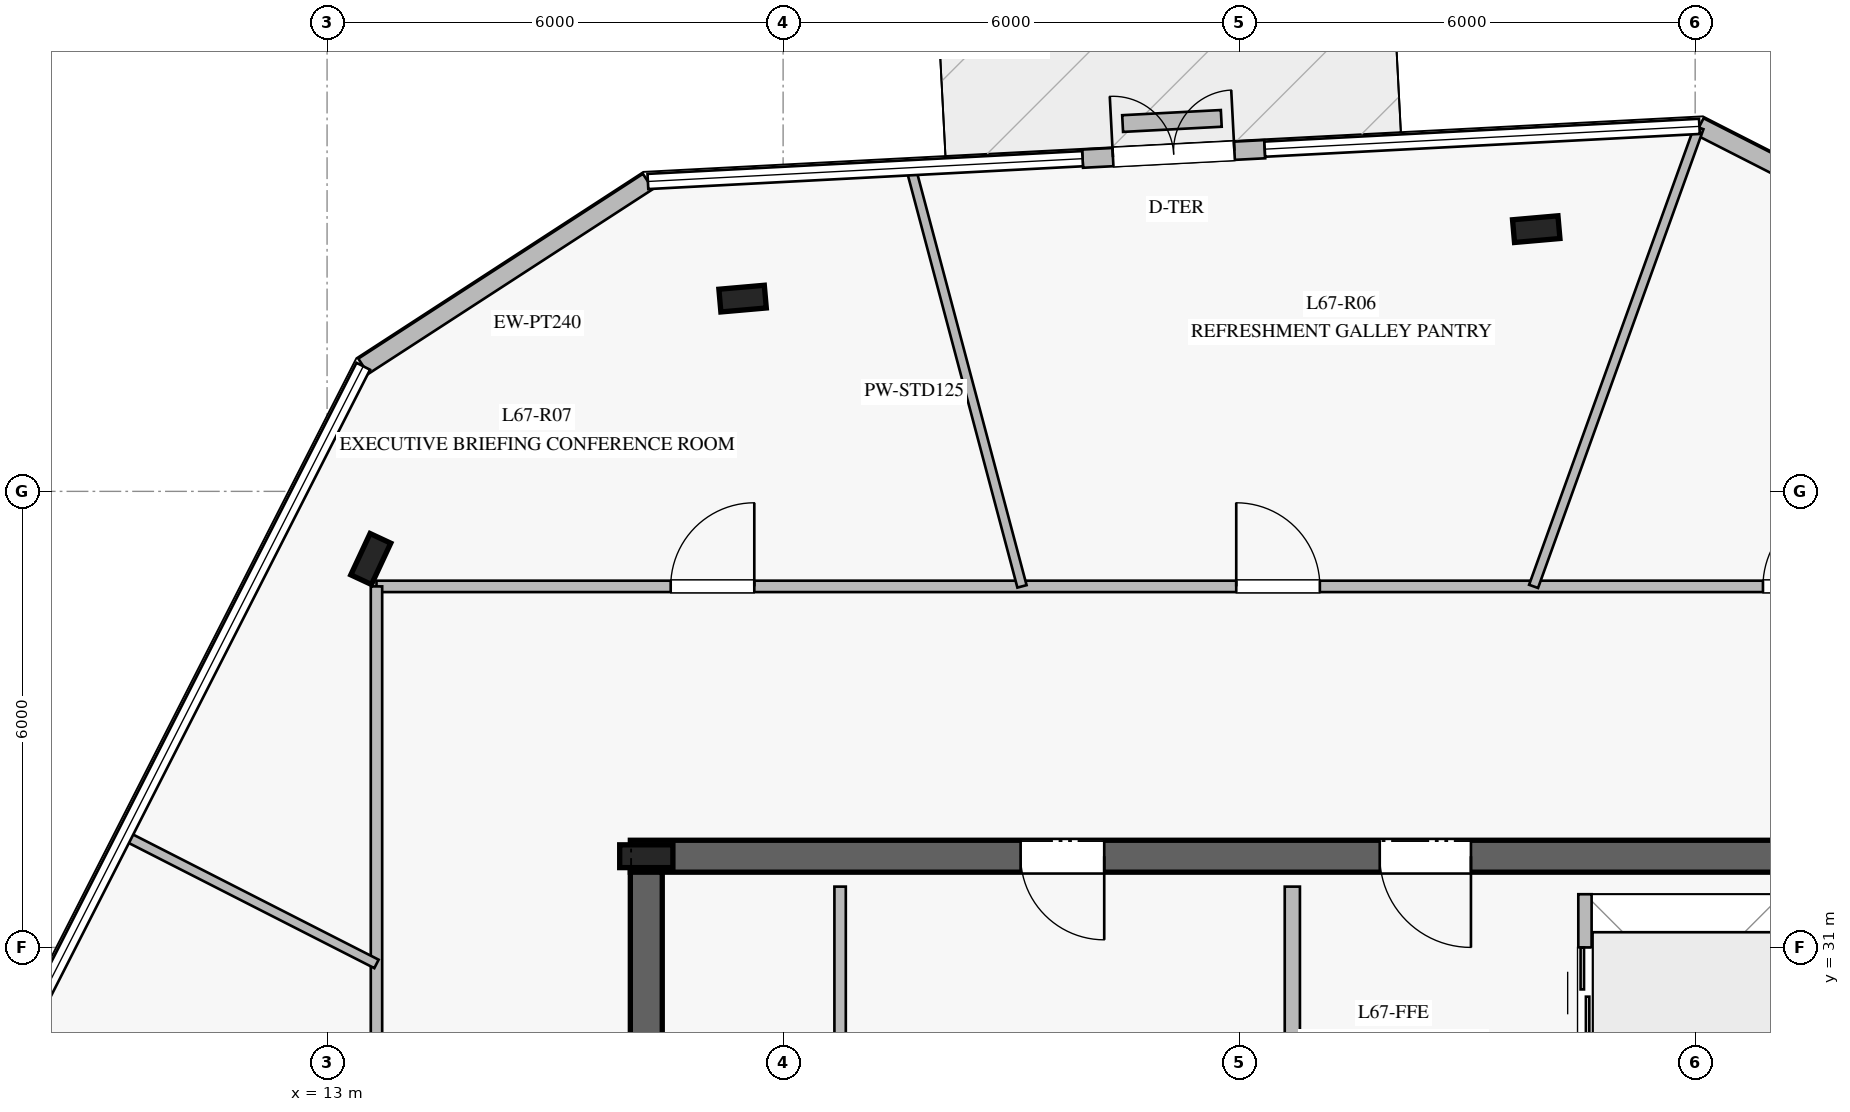
"""IFC4 building model, lengths in metres.
Left out: names, types, materials, properties, quantities, classifications, styles, units other than length and angle.
Written with IfcOpenShell. Run it as: python <this file> out.ifc"""

import sys

from ifc_helpers import new_model, si_unit, direction, frame, frame_2d, origin, origin_2d, place, context, subcontext, project, spatial, rectangle, i_section, extrude, element, fill, save


model = new_model("IFC4")
c1 = context("Model", 3, precision=1e-05, world=origin(), true_north=direction((0.0, 1.0)))
c2 = subcontext(c1, "Body", "Model", "MODEL_VIEW")
j1 = project(units=[si_unit("LENGTHUNIT", "METRE"), si_unit("PLANEANGLEUNIT", "RADIAN")], contexts=[c1])
p1 = place(None, origin())
s1 = spatial("IfcSite", under=j1, at=p1, CompositionType="ELEMENT")
p2 = place(p1, origin())
s2 = spatial("IfcBuilding", under=s1, at=p2, CompositionType="ELEMENT")
p3 = place(p2, frame((0.0, 0.0, 278.2)))
s3 = spatial("IfcBuildingStorey", under=s2, at=p3, CompositionType="ELEMENT", Elevation=278.2)
p4 = place(p3, frame((33.01, 32.2, 0.0), z_axis=(0.0, 0.0, 1.0), x_axis=(-1.0, 0.0, 0.0)))
e1 = element("IfcWall", 1, at=p4, inside=s3, PredefinedType="SHEAR", context=c2, shape_type="SweptSolid", body=[
    extrude(rectangle(XDim=16.02, YDim=0.42, at=frame_2d((8.01, 0.0))), origin(), (0.0, 0.0, 1.0), 3.78),
])
p5 = place(p4, frame((4.96, 0.0, 0.0)))
e2 = element("IfcOpeningElement", 2, at=p5, cuts=e1, PredefinedType="OPENING", context=c2, shape_type="SweptSolid", body=[
    extrude(rectangle(XDim=1.2, YDim=2.25, at=frame_2d((0.6, 1.125))), frame((0.0, 0.22, 0.0), z_axis=(0.0, -1.0, 0.0), x_axis=(1.0, 0.0, 0.0)), (0.0, 0.0, 1.0), 0.44),
])
p6 = place(p4, frame((9.785, 0.0, 0.0)))
e3 = element("IfcOpeningElement", 3, at=p6, cuts=e1, PredefinedType="OPENING", context=c2, shape_type="SweptSolid", body=[
    extrude(rectangle(XDim=1.1, YDim=2.2, at=frame_2d((0.55, 1.1))), frame((0.0, 0.22, 0.0), z_axis=(0.0, -1.0, 0.0), x_axis=(1.0, 0.0, 0.0)), (0.0, 0.0, 1.0), 0.44),
])
p7 = place(p3, frame((17.2, 31.99, 0.0), z_axis=(0.0, 0.0, 1.0), x_axis=(0.0, -1.0, 0.0)))
e4 = element("IfcWall", 4, at=p7, inside=s3, PredefinedType="SHEAR", context=c2, shape_type="SweptSolid", body=[
    extrude(rectangle(XDim=13.98, YDim=0.42, at=frame_2d((6.99, 0.0))), origin(), (0.0, 0.0, 1.0), 3.78),
])
p8 = place(p7, frame((2.14, 0.0, 0.0)))
e5 = element("IfcOpeningElement", 5, at=p8, cuts=e4, PredefinedType="OPENING", context=c2, shape_type="SweptSolid", body=[
    extrude(rectangle(XDim=1.5, YDim=2.2, at=frame_2d((0.75, 1.1))), frame((0.0, 0.22, 0.0), z_axis=(0.0, -1.0, 0.0), x_axis=(1.0, 0.0, 0.0)), (0.0, 0.0, 1.0), 0.44),
])
p9 = place(p3, frame((17.2, 32.2, 0.0), z_axis=(0.0, 0.0, 1.0), x_axis=(1.0, 0.0, 0.0)))
e6 = element("IfcColumn", 6, at=p9, inside=s3, PredefinedType="COLUMN", context=c2, shape_type="SweptSolid", body=[
    extrude(i_section(OverallWidth=0.3, OverallDepth=0.7, WebThickness=0.017, FlangeThickness=0.032, at=origin_2d()), origin(), (0.0, 0.0, 1.0), 4.0),
])
for number, where, z_axis, x_axis in (
    (7, (28.909, 40.45, 0.0), (0.0, 0.0, 1.0), (0.996, 0.087, 0.0)),
    (8, (18.467, 39.536, 0.0), (0.0, 0.0, 1.0), (0.996, 0.087, 0.0)),
    (9, (13.575, 36.11, 0.0), (0.0, 0.0, 1.0), (0.423, 0.906, 0.0)),
):
    element("IfcColumn", number, at=place(p3, frame(where, z_axis=z_axis, x_axis=x_axis)), inside=s3, PredefinedType="COLUMN", context=c2, shape_type="SweptSolid", body=[
        extrude(i_section(OverallWidth=0.3, OverallDepth=0.6, WebThickness=0.015, FlangeThickness=0.03, at=origin_2d()), origin(), (0.0, 0.0, 1.0), 4.0),
    ])
p10 = place(p3, frame((25.337, 41.502, 0.0), z_axis=(0.0, 0.0, 1.0), x_axis=(-0.998643002132, -0.052078347636, 0.0)))
e10 = element("IfcWall", 10, at=p10, inside=s3, PredefinedType="STANDARD", context=c2, shape_type="SweptSolid", body=[
    extrude(rectangle(XDim=2.4, YDim=0.24, at=frame_2d((1.2, 0.0))), origin(), (0.0, 0.0, 1.0), 3.78),
])
p11 = place(p10, frame((0.4, 0.0, 0.0)))
e11 = element("IfcOpeningElement", 11, at=p11, cuts=e10, PredefinedType="OPENING", context=c2, shape_type="SweptSolid", body=[
    extrude(rectangle(XDim=1.6, YDim=2.25, at=frame_2d((0.8, 1.125))), frame((0.0, 0.13, 0.0), z_axis=(0.0, -1.0, 0.0), x_axis=(1.0, 0.0, 0.0)), (0.0, 0.0, 1.0), 0.26),
])
p12 = place(p3, frame((17.221, 41.077, 0.0), z_axis=(0.0, 0.0, 1.0), x_axis=(-0.838777032967, -0.544475058169, 0.0)))
e12 = element("IfcWall", 12, at=p12, inside=s3, PredefinedType="STANDARD", context=c2, shape_type="SweptSolid", body=[
    extrude(rectangle(XDim=4.465, YDim=0.24, at=frame_2d((2.232, 0.0))), origin(), (0.0, 0.0, 1.0), 3.78),
])
p13 = place(p3, frame((35.034, 39.775, 0.0), z_axis=(0.0, 0.0, 1.0), x_axis=(-0.890988997793, 0.454024895586, 0.0)))
e13 = element("IfcWall", 13, at=p13, inside=s3, PredefinedType="STANDARD", context=c2, shape_type="SweptSolid", body=[
    extrude(rectangle(XDim=4.465, YDim=0.24, at=frame_2d((2.232, 0.0))), origin(), (0.0, 0.0, 1.0), 3.78),
])
p14 = place(p3, frame((24.765, 41.907, 0.0), z_axis=(0.0, 0.0, 1.0), x_axis=(-0.998635416873, -0.052223597797, 0.0)))
e14 = element("IfcWall", 14, at=p14, inside=s3, PredefinedType="USERDEFINED", context=c2, shape_type="SweptSolid", body=[
    extrude(rectangle(XDim=1.3, YDim=0.22, at=frame_2d((0.65, 0.0))), origin(), (0.0, 0.0, 1.0), 0.4),
])
p15 = place(p3, frame((25.7, 26.65, 0.0), z_axis=(0.0, 0.0, 1.0), x_axis=(0.0, 1.0, 0.0)))
e15 = element("IfcWall", 15, at=p15, inside=s3, PredefinedType="PARTITIONING", context=c2, shape_type="SweptSolid", body=[
    extrude(rectangle(XDim=5.15, YDim=0.2, at=frame_2d((2.575, 0.0))), origin(), (0.0, 0.0, 1.0), 3.78),
])
p16 = place(p3, frame((19.75, 29.39, 0.0), z_axis=(0.0, 0.0, 1.0), x_axis=(0.0, 1.0, 0.0)))
e16 = element("IfcWall", 16, at=p16, inside=s3, PredefinedType="PARTITIONING", context=c2, shape_type="SweptSolid", body=[
    extrude(rectangle(XDim=2.41, YDim=0.15, at=frame_2d((1.205, 0.0))), origin(), (0.0, 0.0, 1.0), 3.78),
])
p17 = place(p3, frame((29.55, 29.1, 0.0), z_axis=(0.0, 0.0, 1.0), x_axis=(0.0, 1.0, 0.0)))
e17 = element("IfcWall", 17, at=p17, inside=s3, PredefinedType="PARTITIONING", context=c2, shape_type="SweptSolid", body=[
    extrude(rectangle(XDim=2.6, YDim=0.175, at=frame_2d((1.3, 0.0))), origin(), (0.0, 0.0, 1.0), 3.78),
])
p18 = place(p17, frame((0.7, 0.0, 0.0)))
e18 = element("IfcOpeningElement", 18, at=p18, cuts=e17, PredefinedType="OPENING", context=c2, shape_type="SweptSolid", body=[
    extrude(rectangle(XDim=1.2, YDim=2.2, at=frame_2d((0.6, 1.1))), frame((0.0, 0.098, 0.0), z_axis=(0.0, -1.0, 0.0), x_axis=(1.0, 0.0, 0.0)), (0.0, 0.0, 1.0), 0.195),
])
p19 = place(p3, frame((13.65, 35.75, 0.0), z_axis=(0.0, 0.0, 1.0), x_axis=(1.0, 0.0, 0.0)))
e19 = element("IfcWall", 19, at=p19, inside=s3, PredefinedType="PARTITIONING", context=c2, shape_type="SweptSolid", body=[
    extrude(rectangle(XDim=22.7, YDim=0.15, at=frame_2d((11.35, 0.0))), origin(), (0.0, 0.0, 1.0), 3.05),
])
p20 = place(p19, frame((18.242, 0.0, 0.0)))
e20 = element("IfcOpeningElement", 20, at=p20, cuts=e19, PredefinedType="OPENING", context=c2, shape_type="SweptSolid", body=[
    extrude(rectangle(XDim=1.1, YDim=2.2, at=frame_2d((0.55, 1.1))), frame((0.0, 0.085, 0.0), z_axis=(0.0, -1.0, 0.0), x_axis=(1.0, 0.0, 0.0)), (0.0, 0.0, 1.0), 0.17),
])
p21 = place(p19, frame((11.312, 0.0, 0.0)))
e21 = element("IfcOpeningElement", 21, at=p21, cuts=e19, PredefinedType="OPENING", context=c2, shape_type="SweptSolid", body=[
    extrude(rectangle(XDim=1.1, YDim=2.2, at=frame_2d((0.55, 1.1))), frame((0.0, 0.085, 0.0), z_axis=(0.0, -1.0, 0.0), x_axis=(1.0, 0.0, 0.0)), (0.0, 0.0, 1.0), 0.17),
])
p22 = place(p19, frame((3.871, 0.0, 0.0)))
e22 = element("IfcOpeningElement", 22, at=p22, cuts=e19, PredefinedType="OPENING", context=c2, shape_type="SweptSolid", body=[
    extrude(rectangle(XDim=1.1, YDim=2.2, at=frame_2d((0.55, 1.1))), frame((0.0, 0.085, 0.0), z_axis=(0.0, -1.0, 0.0), x_axis=(1.0, 0.0, 0.0)), (0.0, 0.0, 1.0), 0.17),
])
p23 = place(p3, frame((13.65, 14.25, 0.0), z_axis=(0.0, 0.0, 1.0), x_axis=(0.0, 1.0, 0.0)))
e23 = element("IfcWall", 23, at=p23, inside=s3, PredefinedType="PARTITIONING", context=c2, shape_type="SweptSolid", body=[
    extrude(rectangle(XDim=21.5, YDim=0.15, at=frame_2d((10.75, 0.0))), origin(), (0.0, 0.0, 1.0), 3.22),
])
p24 = place(p23, frame((10.359, 0.0, 0.0)))
e24 = element("IfcOpeningElement", 24, at=p24, cuts=e23, PredefinedType="OPENING", context=c2, shape_type="SweptSolid", body=[
    extrude(rectangle(XDim=1.1, YDim=2.2, at=frame_2d((0.55, 1.1))), frame((0.0, 0.085, 0.0), z_axis=(0.0, -1.0, 0.0), x_axis=(1.0, 0.0, 0.0)), (0.0, 0.0, 1.0), 0.17),
])
p25 = place(p3, frame((22.143, 35.75, 0.0), z_axis=(0.0, 0.0, 1.0), x_axis=(-0.256710699473, 0.96648829107, 0.0)))
e25 = element("IfcWall", 25, at=p25, inside=s3, PredefinedType="PARTITIONING", context=c2, shape_type="SweptSolid", body=[
    extrude(rectangle(XDim=5.683, YDim=0.125, at=frame_2d((2.842, 0.0))), origin(), (0.0, 0.0, 1.0), 3.28),
])
p26 = place(p3, frame((13.65, 30.783, 0.0), z_axis=(0.0, 0.0, 1.0), x_axis=(-0.890937484948, 0.454125971416, 0.0)))
e26 = element("IfcWall", 26, at=p26, inside=s3, PredefinedType="PARTITIONING", context=c2, shape_type="SweptSolid", body=[
    extrude(rectangle(XDim=3.708, YDim=0.125, at=frame_2d((1.854, 0.0))), origin(), (0.0, 0.0, 1.0), 3.28),
])
p27 = place(p3, frame((28.874, 35.75, 0.0), z_axis=(0.0, 0.0, 1.0), x_axis=(0.3391479103, 0.940733062531, 0.0)))
e27 = element("IfcWall", 27, at=p27, inside=s3, PredefinedType="PARTITIONING", context=c2, shape_type="SweptSolid", body=[
    extrude(rectangle(XDim=6.416, YDim=0.125, at=frame_2d((3.208, 0.0))), origin(), (0.0, 0.0, 1.0), 3.05),
])
p28 = place(p11, frame((1.6, 0.0, 0.0), z_axis=(0.0, 0.0, 1.0), x_axis=(-1.0, 0.0, 0.0)))
e28 = element("IfcDoor", 28, at=p28, inside=s3, OperationType="DOUBLE_DOOR_SINGLE_SWING", PredefinedType="DOOR", context=c2, shape_type="SweptSolid", body=[
    extrude(rectangle(XDim=1.6, YDim=2.25, at=frame_2d((0.8, 1.125))), frame((0.0, 0.025, 0.0), z_axis=(0.0, -1.0, 0.0), x_axis=(1.0, 0.0, 0.0)), (0.0, 0.0, 1.0), 0.05),
])
fill(e11, e28)
p29 = place(p5, origin())
e29 = element("IfcDoor", 29, at=p29, inside=s3, OperationType="SINGLE_SWING_LEFT", PredefinedType="DOOR", context=c2, shape_type="SweptSolid", body=[
    extrude(rectangle(XDim=1.2, YDim=2.25, at=frame_2d((0.6, 1.125))), frame((0.0, 0.025, 0.0), z_axis=(0.0, -1.0, 0.0), x_axis=(1.0, 0.0, 0.0)), (0.0, 0.0, 1.0), 0.05),
])
fill(e2, e29)
p30 = place(p6, origin())
e30 = element("IfcDoor", 30, at=p30, inside=s3, OperationType="SINGLE_SWING_LEFT", PredefinedType="DOOR", context=c2, shape_type="SweptSolid", body=[
    extrude(rectangle(XDim=1.1, YDim=2.2, at=frame_2d((0.55, 1.1))), frame((0.0, 0.025, 0.0), z_axis=(0.0, -1.0, 0.0), x_axis=(1.0, 0.0, 0.0)), (0.0, 0.0, 1.0), 0.05),
])
fill(e3, e30)
p31 = place(p18, origin())
e31 = element("IfcDoor", 31, at=p31, inside=s3, OperationType="DOUBLE_DOOR_SLIDING", PredefinedType="DOOR", context=c2, shape_type="SweptSolid", body=[
    extrude(rectangle(XDim=1.2, YDim=2.2, at=frame_2d((0.6, 1.1))), frame((0.0, 0.025, 0.0), z_axis=(0.0, -1.0, 0.0), x_axis=(1.0, 0.0, 0.0)), (0.0, 0.0, 1.0), 0.05),
])
fill(e18, e31)
p32 = place(p20, origin())
e32 = element("IfcDoor", 32, at=p32, inside=s3, OperationType="SINGLE_SWING_RIGHT", PredefinedType="DOOR", context=c2, shape_type="SweptSolid", body=[
    extrude(rectangle(XDim=1.1, YDim=2.2, at=frame_2d((0.55, 1.1))), frame((0.0, 0.025, 0.0), z_axis=(0.0, -1.0, 0.0), x_axis=(1.0, 0.0, 0.0)), (0.0, 0.0, 1.0), 0.05),
])
fill(e20, e32)
p33 = place(p21, origin())
e33 = element("IfcDoor", 33, at=p33, inside=s3, OperationType="SINGLE_SWING_LEFT", PredefinedType="DOOR", context=c2, shape_type="SweptSolid", body=[
    extrude(rectangle(XDim=1.1, YDim=2.2, at=frame_2d((0.55, 1.1))), frame((0.0, 0.025, 0.0), z_axis=(0.0, -1.0, 0.0), x_axis=(1.0, 0.0, 0.0)), (0.0, 0.0, 1.0), 0.05),
])
fill(e21, e33)
p34 = place(p22, origin())
e34 = element("IfcDoor", 34, at=p34, inside=s3, OperationType="SINGLE_SWING_RIGHT", PredefinedType="DOOR", context=c2, shape_type="SweptSolid", body=[
    extrude(rectangle(XDim=1.1, YDim=2.2, at=frame_2d((0.55, 1.1))), frame((0.0, 0.025, 0.0), z_axis=(0.0, -1.0, 0.0), x_axis=(1.0, 0.0, 0.0)), (0.0, 0.0, 1.0), 0.05),
])
fill(e22, e34)
save(model, sys.argv[1])
